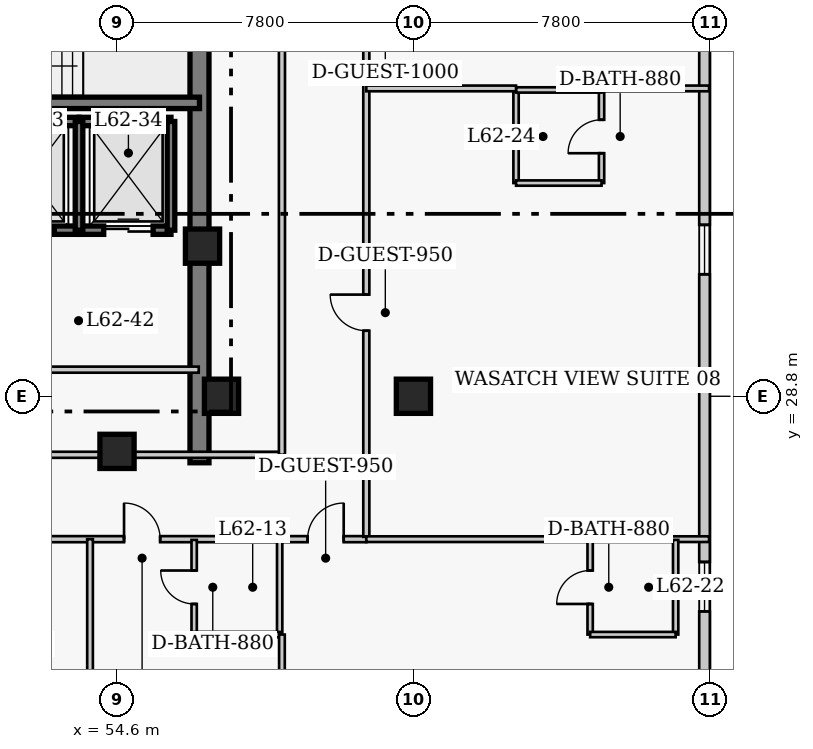
"""IFC4 building model, lengths in metres.
Left out: names, types, materials, properties, quantities, classifications, styles, units other than length and angle.
Written with IfcOpenShell. Run it as: python <this file> out.ifc"""

import sys

from ifc_helpers import new_model, si_unit, direction, frame, frame_2d, origin, origin_2d, place, context, subcontext, project, spatial, rectangle, extrude, element, fill, save


model = new_model("IFC4")
c1 = context("Model", 3, precision=1e-05, world=origin(), true_north=direction((0.0, 1.0)))
c2 = subcontext(c1, "Body", "Model", "MODEL_VIEW")
j1 = project(units=[si_unit("LENGTHUNIT", "METRE"), si_unit("PLANEANGLEUNIT", "RADIAN")], contexts=[c1])
p1 = place(None, origin())
s1 = spatial("IfcSite", under=j1, at=p1, CompositionType="ELEMENT")
p2 = place(p1, origin())
s2 = spatial("IfcBuilding", under=s1, at=p2, CompositionType="ELEMENT")
p3 = place(p2, frame((0.0, 0.0, 249.4)))
s3 = spatial("IfcBuildingStorey", under=s2, at=p3, CompositionType="ELEMENT", Elevation=249.4)
p4 = place(p3, frame((56.77, 27.05, 0.0), z_axis=(0.0, 0.0, 1.0), x_axis=(0.0, 1.0, 0.0)))
e1 = element("IfcWall", 1, at=p4, inside=s3, PredefinedType="SHEAR", context=c2, shape_type="SweptSolid", body=[
    extrude(rectangle(XDim=13.52, YDim=0.5, at=frame_2d((6.76, 0.0))), origin(), (0.0, 0.0, 1.0), 4.0),
])
p5 = place(p3, frame((48.45, 36.52, 0.0), z_axis=(0.0, 0.0, 1.0), x_axis=(1.0, 0.0, 0.0)))
e2 = element("IfcWall", 2, at=p5, inside=s3, PredefinedType="SHEAR", context=c2, shape_type="SweptSolid", body=[
    extrude(rectangle(XDim=8.32, YDim=0.3, at=frame_2d((4.16, 0.0))), origin(), (0.0, 0.0, 1.0), 4.0),
])
for number, where, z_axis, x_axis in (
    (3, (62.4, 28.8, 0.0), (0.0, 0.0, 1.0), (1.0, 0.0, 0.0)),
    (4, (57.35, 28.8, 0.0), (0.0, 0.0, 1.0), (1.0, 0.0, 0.0)),
    (5, (54.6, 27.35, 0.0), (0.0, 0.0, 1.0), (1.0, 0.0, 0.0)),
    (6, (56.85, 32.75, 0.0), (0.0, 0.0, 1.0), (1.0, 0.0, 0.0)),
):
    element("IfcColumn", number, at=place(p3, frame(where, z_axis=z_axis, x_axis=x_axis)), inside=s3, PredefinedType="COLUMN", context=c2, shape_type="SweptSolid", body=[
        extrude(rectangle(XDim=0.9, YDim=0.9, at=origin_2d()), origin(), (0.0, 0.0, 1.0), 4.0),
    ])
p6 = place(p3, frame((70.06, 13.36, 0.0), z_axis=(0.0, 0.0, 1.0), x_axis=(0.0, 1.0, 0.0)))
e7 = element("IfcWall", 7, at=p6, inside=s3, PredefinedType="SOLIDWALL", context=c2, shape_type="SweptSolid", body=[
    extrude(rectangle(XDim=30.88, YDim=0.28, at=frame_2d((15.44, 0.0))), origin(), (0.0, 0.0, 1.0), 3.76),
])
p7 = place(p6, frame((3.21, 0.0, 0.85)))
e8 = element("IfcOpeningElement", 8, at=p7, cuts=e7, PredefinedType="OPENING", context=c2, shape_type="SweptSolid", body=[
    extrude(rectangle(XDim=1.3, YDim=1.7, at=frame_2d((0.65, 0.85))), frame((0.0, 0.15, 0.0), z_axis=(0.0, -1.0, 0.0), x_axis=(1.0, 0.0, 0.0)), (0.0, 0.0, 1.0), 0.3),
])
p8 = place(p6, frame((9.78, 0.0, 0.85)))
e9 = element("IfcOpeningElement", 9, at=p8, cuts=e7, PredefinedType="OPENING", context=c2, shape_type="SweptSolid", body=[
    extrude(rectangle(XDim=1.3, YDim=1.7, at=frame_2d((0.65, 0.85))), frame((0.0, 0.15, 0.0), z_axis=(0.0, -1.0, 0.0), x_axis=(1.0, 0.0, 0.0)), (0.0, 0.0, 1.0), 0.3),
])
p9 = place(p6, frame((18.65, 0.0, 0.85)))
e10 = element("IfcOpeningElement", 10, at=p9, cuts=e7, PredefinedType="OPENING", context=c2, shape_type="SweptSolid", body=[
    extrude(rectangle(XDim=1.3, YDim=1.7, at=frame_2d((0.65, 0.85))), frame((0.0, 0.15, 0.0), z_axis=(0.0, -1.0, 0.0), x_axis=(1.0, 0.0, 0.0)), (0.0, 0.0, 1.0), 0.3),
])
p10 = place(p6, frame((26.37, 0.0, 0.85)))
e11 = element("IfcOpeningElement", 11, at=p10, cuts=e7, PredefinedType="OPENING", context=c2, shape_type="SweptSolid", body=[
    extrude(rectangle(XDim=1.3, YDim=1.7, at=frame_2d((0.65, 0.85))), frame((0.0, 0.15, 0.0), z_axis=(0.0, -1.0, 0.0), x_axis=(1.0, 0.0, 0.0)), (0.0, 0.0, 1.0), 0.3),
])
p11 = place(p3, frame((51.18, 36.03, 0.0), z_axis=(0.0, 0.0, 1.0), x_axis=(1.0, 0.0, 0.0)))
e12 = element("IfcWall", 12, at=p11, inside=s3, PredefinedType="SHEAR", context=c2, shape_type="SweptSolid", body=[
    extrude(rectangle(XDim=2.42, YDim=0.22, at=frame_2d((1.21, 0.0))), origin(), (0.0, 0.0, 1.0), 4.0),
])
p12 = place(p3, frame((51.18, 33.17, 0.0), z_axis=(0.0, 0.0, 1.0), x_axis=(1.0, 0.0, 0.0)))
e13 = element("IfcWall", 13, at=p12, inside=s3, PredefinedType="SHEAR", context=c2, shape_type="SweptSolid", body=[
    extrude(rectangle(XDim=2.42, YDim=0.22, at=frame_2d((1.21, 0.0))), origin(), (0.0, 0.0, 1.0), 4.0),
])
p13 = place(p12, frame((0.47, 0.0, 0.0)))
e14 = element("IfcOpeningElement", 14, at=p13, cuts=e13, PredefinedType="OPENING", context=c2, shape_type="SweptSolid", body=[
    extrude(rectangle(XDim=1.3, YDim=2.15, at=frame_2d((0.65, 1.075))), frame((0.0, 0.12, 0.0), z_axis=(0.0, -1.0, 0.0), x_axis=(1.0, 0.0, 0.0)), (0.0, 0.0, 1.0), 0.24),
])
p14 = place(p3, frame((53.6, 36.03, 0.0), z_axis=(0.0, 0.0, 1.0), x_axis=(1.0, 0.0, 0.0)))
e15 = element("IfcWall", 15, at=p14, inside=s3, PredefinedType="SHEAR", context=c2, shape_type="SweptSolid", body=[
    extrude(rectangle(XDim=2.42, YDim=0.22, at=frame_2d((1.21, 0.0))), origin(), (0.0, 0.0, 1.0), 4.0),
])
p15 = place(p3, frame((53.6, 33.17, 0.0), z_axis=(0.0, 0.0, 1.0), x_axis=(1.0, 0.0, 0.0)))
e16 = element("IfcWall", 16, at=p15, inside=s3, PredefinedType="SHEAR", context=c2, shape_type="SweptSolid", body=[
    extrude(rectangle(XDim=2.42, YDim=0.22, at=frame_2d((1.21, 0.0))), origin(), (0.0, 0.0, 1.0), 4.0),
])
p16 = place(p15, frame((0.65, 0.0, 0.0)))
e17 = element("IfcOpeningElement", 17, at=p16, cuts=e16, PredefinedType="OPENING", context=c2, shape_type="SweptSolid", body=[
    extrude(rectangle(XDim=1.3, YDim=2.15, at=frame_2d((0.65, 1.075))), frame((0.0, 0.12, 0.0), z_axis=(0.0, -1.0, 0.0), x_axis=(1.0, 0.0, 0.0)), (0.0, 0.0, 1.0), 0.24),
])
for number, where, z_axis, x_axis in (
    (18, (53.6, 33.17, 0.0), (0.0, 0.0, 1.0), (0.0, 1.0, 0.0)),
    (19, (56.02, 33.17, 0.0), (0.0, 0.0, 1.0), (0.0, 1.0, 0.0)),
):
    element("IfcWall", number, at=place(p3, frame(where, z_axis=z_axis, x_axis=x_axis)), inside=s3, PredefinedType="SHEAR", context=c2, shape_type="SweptSolid", body=[
        extrude(rectangle(XDim=2.86, YDim=0.2, at=frame_2d((1.43, 0.0))), origin(), (0.0, 0.0, 1.0), 4.0),
    ])
p17 = place(p3, frame((51.12, 29.5, 0.0), z_axis=(0.0, 0.0, 1.0), x_axis=(1.0, 0.0, 0.0)))
e20 = element("IfcWall", 20, at=p17, inside=s3, PredefinedType="PARTITIONING", context=c2, shape_type="SweptSolid", body=[
    extrude(rectangle(XDim=5.63, YDim=0.16, at=frame_2d((2.815, 0.0))), origin(), (0.0, 0.0, 1.0), 3.76),
])
p18 = place(p3, frame((35.85, 27.26, 0.0), z_axis=(0.0, 0.0, 1.0), x_axis=(1.0, 0.0, 0.0)))
e21 = element("IfcWall", 21, at=p18, inside=s3, PredefinedType="PARTITIONING", context=c2, shape_type="SweptSolid", body=[
    extrude(rectangle(XDim=23.15, YDim=0.16, at=frame_2d((11.575, 0.0))), origin(), (0.0, 0.0, 1.0), 3.76),
])
p19 = place(p18, frame((5.35, 0.0, 0.0)))
e22 = element("IfcOpeningElement", 22, at=p19, cuts=e21, PredefinedType="OPENING", context=c2, shape_type="SweptSolid", body=[
    extrude(rectangle(XDim=1.0, YDim=2.15, at=frame_2d((0.5, 1.075))), frame((0.0, 0.09, 0.0), z_axis=(0.0, -1.0, 0.0), x_axis=(1.0, 0.0, 0.0)), (0.0, 0.0, 1.0), 0.18),
])
p20 = place(p18, frame((12.85, 0.0, 0.0)))
e23 = element("IfcOpeningElement", 23, at=p20, cuts=e21, PredefinedType="OPENING", context=c2, shape_type="SweptSolid", body=[
    extrude(rectangle(XDim=1.0, YDim=2.15, at=frame_2d((0.5, 1.075))), frame((0.0, 0.09, 0.0), z_axis=(0.0, -1.0, 0.0), x_axis=(1.0, 0.0, 0.0)), (0.0, 0.0, 1.0), 0.18),
])
p21 = place(p3, frame((35.8, 25.04, 0.0), z_axis=(0.0, 0.0, 1.0), x_axis=(1.0, 0.0, 0.0)))
e24 = element("IfcWall", 24, at=p21, inside=s3, PredefinedType="PARTITIONING", context=c2, shape_type="SweptSolid", body=[
    extrude(rectangle(XDim=25.36, YDim=0.16, at=frame_2d((12.68, 0.0))), origin(), (0.0, 0.0, 1.0), 3.76),
])
p22 = place(p21, frame((1.518, 0.0, 0.0)))
e25 = element("IfcOpeningElement", 25, at=p22, cuts=e24, PredefinedType="OPENING", context=c2, shape_type="SweptSolid", body=[
    extrude(rectangle(XDim=0.95, YDim=2.1, at=frame_2d((0.475, 1.05))), frame((0.0, 0.09, 0.0), z_axis=(0.0, -1.0, 0.0), x_axis=(1.0, 0.0, 0.0)), (0.0, 0.0, 1.0), 0.18),
])
p23 = place(p21, frame((9.278, 0.0, 0.0)))
e26 = element("IfcOpeningElement", 26, at=p23, cuts=e24, PredefinedType="OPENING", context=c2, shape_type="SweptSolid", body=[
    extrude(rectangle(XDim=1.0, YDim=2.15, at=frame_2d((0.5, 1.075))), frame((0.0, 0.09, 0.0), z_axis=(0.0, -1.0, 0.0), x_axis=(1.0, 0.0, 0.0)), (0.0, 0.0, 1.0), 0.18),
])
p24 = place(p21, frame((16.06, 0.0, 0.0)))
e27 = element("IfcOpeningElement", 27, at=p24, cuts=e24, PredefinedType="OPENING", context=c2, shape_type="SweptSolid", body=[
    extrude(rectangle(XDim=0.95, YDim=2.1, at=frame_2d((0.475, 1.05))), frame((0.0, 0.09, 0.0), z_axis=(0.0, -1.0, 0.0), x_axis=(1.0, 0.0, 0.0)), (0.0, 0.0, 1.0), 0.18),
])
p25 = place(p21, frame((18.985, 0.0, 0.0)))
e28 = element("IfcOpeningElement", 28, at=p25, cuts=e24, PredefinedType="OPENING", context=c2, shape_type="SweptSolid", body=[
    extrude(rectangle(XDim=0.95, YDim=2.1, at=frame_2d((0.475, 1.05))), frame((0.0, 0.09, 0.0), z_axis=(0.0, -1.0, 0.0), x_axis=(1.0, 0.0, 0.0)), (0.0, 0.0, 1.0), 0.18),
])
p26 = place(p21, frame((23.815, 0.0, 0.0)))
e29 = element("IfcOpeningElement", 29, at=p26, cuts=e24, PredefinedType="OPENING", context=c2, shape_type="SweptSolid", body=[
    extrude(rectangle(XDim=0.95, YDim=2.1, at=frame_2d((0.475, 1.05))), frame((0.0, 0.09, 0.0), z_axis=(0.0, -1.0, 0.0), x_axis=(1.0, 0.0, 0.0)), (0.0, 0.0, 1.0), 0.18),
])
p27 = place(p3, frame((61.16, 25.1, 0.0), z_axis=(0.0, 0.0, 1.0), x_axis=(0.0, 1.0, 0.0)))
e30 = element("IfcWall", 30, at=p27, inside=s3, PredefinedType="PARTITIONING", context=c2, shape_type="SweptSolid", body=[
    extrude(rectangle(XDim=15.55, YDim=0.16, at=frame_2d((7.775, 0.0))), origin(), (0.0, 0.0, 1.0), 3.76),
])
p28 = place(p27, frame((5.425, 0.0, 0.0)))
e31 = element("IfcOpeningElement", 31, at=p28, cuts=e30, PredefinedType="OPENING", context=c2, shape_type="SweptSolid", body=[
    extrude(rectangle(XDim=0.95, YDim=2.1, at=frame_2d((0.475, 1.05))), frame((0.0, 0.09, 0.0), z_axis=(0.0, -1.0, 0.0), x_axis=(1.0, 0.0, 0.0)), (0.0, 0.0, 1.0), 0.18),
])
p29 = place(p27, frame((14.11, 0.0, 0.0)))
e32 = element("IfcOpeningElement", 32, at=p29, cuts=e30, PredefinedType="OPENING", context=c2, shape_type="SweptSolid", body=[
    extrude(rectangle(XDim=1.0, YDim=2.15, at=frame_2d((0.5, 1.075))), frame((0.0, 0.09, 0.0), z_axis=(0.0, -1.0, 0.0), x_axis=(1.0, 0.0, 0.0)), (0.0, 0.0, 1.0), 0.18),
])
p30 = place(p3, frame((58.94, 27.26, 0.0), z_axis=(0.0, 0.0, 1.0), x_axis=(0.0, 1.0, 0.0)))
e33 = element("IfcWall", 33, at=p30, inside=s3, PredefinedType="PARTITIONING", context=c2, shape_type="SweptSolid", body=[
    extrude(rectangle(XDim=13.39, YDim=0.16, at=frame_2d((6.695, 0.0))), origin(), (0.0, 0.0, 1.0), 3.76),
])
p31 = place(p3, frame((53.89, 9.72, 0.0), z_axis=(0.0, 0.0, 1.0), x_axis=(0.0, 1.0, 0.0)))
e34 = element("IfcWall", 34, at=p31, inside=s3, PredefinedType="PARTITIONING", context=c2, shape_type="SweptSolid", body=[
    extrude(rectangle(XDim=15.32, YDim=0.15, at=frame_2d((7.66, 0.0))), origin(), (0.0, 0.0, 1.0), 3.76),
])
p32 = place(p3, frame((56.63, 22.53, 0.0), z_axis=(0.0, 0.0, 1.0), x_axis=(0.0, 1.0, 0.0)))
e35 = element("IfcWall", 35, at=p32, inside=s3, PredefinedType="PLUMBINGWALL", context=c2, shape_type="SweptSolid", body=[
    extrude(rectangle(XDim=2.49, YDim=0.14, at=frame_2d((1.245, 0.0))), origin(), (0.0, 0.0, 1.0), 3.76),
])
p33 = place(p32, frame((0.805, 0.0, 0.0)))
e36 = element("IfcOpeningElement", 36, at=p33, cuts=e35, PredefinedType="OPENING", context=c2, shape_type="SweptSolid", body=[
    extrude(rectangle(XDim=0.88, YDim=2.05, at=frame_2d((0.44, 1.025))), frame((0.0, 0.08, 0.0), z_axis=(0.0, -1.0, 0.0), x_axis=(1.0, 0.0, 0.0)), (0.0, 0.0, 1.0), 0.16),
])
p34 = place(p3, frame((58.88, 22.53, 0.0), z_axis=(0.0, 0.0, 1.0), x_axis=(0.0, 1.0, 0.0)))
e37 = element("IfcWall", 37, at=p34, inside=s3, PredefinedType="PLUMBINGWALL", context=c2, shape_type="SweptSolid", body=[
    extrude(rectangle(XDim=2.49, YDim=0.14, at=frame_2d((1.245, 0.0))), origin(), (0.0, 0.0, 1.0), 3.76),
])
p35 = place(p3, frame((56.63, 22.53, 0.0), z_axis=(0.0, 0.0, 1.0), x_axis=(1.0, 0.0, 0.0)))
e38 = element("IfcWall", 38, at=p35, inside=s3, PredefinedType="PLUMBINGWALL", context=c2, shape_type="SweptSolid", body=[
    extrude(rectangle(XDim=2.25, YDim=0.14, at=frame_2d((1.125, 0.0))), origin(), (0.0, 0.0, 1.0), 3.76),
])
p36 = place(p3, frame((58.94, 9.72, 0.0), z_axis=(0.0, 0.0, 1.0), x_axis=(0.0, 1.0, 0.0)))
e39 = element("IfcWall", 39, at=p36, inside=s3, PredefinedType="PARTITIONING", context=c2, shape_type="SweptSolid", body=[
    extrude(rectangle(XDim=12.81, YDim=0.15, at=frame_2d((6.405, 0.0))), origin(), (0.0, 0.0, 1.0), 3.76),
])
p37 = place(p3, frame((61.16, 25.04, 0.0), z_axis=(0.0, 0.0, 1.0), x_axis=(1.0, 0.0, 0.0)))
e40 = element("IfcWall", 40, at=p37, inside=s3, PredefinedType="PARTITIONING", context=c2, shape_type="SweptSolid", body=[
    extrude(rectangle(XDim=9.02, YDim=0.15, at=frame_2d((4.51, 0.0))), origin(), (0.0, 0.0, 1.0), 3.76),
])
p38 = place(p3, frame((67.05, 22.53, 0.0), z_axis=(0.0, 0.0, 1.0), x_axis=(0.0, 1.0, 0.0)))
e41 = element("IfcWall", 41, at=p38, inside=s3, PredefinedType="PLUMBINGWALL", context=c2, shape_type="SweptSolid", body=[
    extrude(rectangle(XDim=2.49, YDim=0.14, at=frame_2d((1.245, 0.0))), origin(), (0.0, 0.0, 1.0), 3.76),
])
p39 = place(p38, frame((0.805, 0.0, 0.0)))
e42 = element("IfcOpeningElement", 42, at=p39, cuts=e41, PredefinedType="OPENING", context=c2, shape_type="SweptSolid", body=[
    extrude(rectangle(XDim=0.88, YDim=2.05, at=frame_2d((0.44, 1.025))), frame((0.0, 0.08, 0.0), z_axis=(0.0, -1.0, 0.0), x_axis=(1.0, 0.0, 0.0)), (0.0, 0.0, 1.0), 0.16),
])
p40 = place(p3, frame((69.3, 22.53, 0.0), z_axis=(0.0, 0.0, 1.0), x_axis=(0.0, 1.0, 0.0)))
e43 = element("IfcWall", 43, at=p40, inside=s3, PredefinedType="PLUMBINGWALL", context=c2, shape_type="SweptSolid", body=[
    extrude(rectangle(XDim=2.49, YDim=0.14, at=frame_2d((1.245, 0.0))), origin(), (0.0, 0.0, 1.0), 3.76),
])
p41 = place(p3, frame((67.05, 22.53, 0.0), z_axis=(0.0, 0.0, 1.0), x_axis=(1.0, 0.0, 0.0)))
e44 = element("IfcWall", 44, at=p41, inside=s3, PredefinedType="PLUMBINGWALL", context=c2, shape_type="SweptSolid", body=[
    extrude(rectangle(XDim=2.25, YDim=0.14, at=frame_2d((1.125, 0.0))), origin(), (0.0, 0.0, 1.0), 3.76),
])
p42 = place(p3, frame((65.1, 34.41, 0.0), z_axis=(0.0, 0.0, 1.0), x_axis=(0.0, 1.0, 0.0)))
e45 = element("IfcWall", 45, at=p42, inside=s3, PredefinedType="PLUMBINGWALL", context=c2, shape_type="SweptSolid", body=[
    extrude(rectangle(XDim=2.45, YDim=0.14, at=frame_2d((1.225, 0.0))), origin(), (0.0, 0.0, 1.0), 3.76),
])
p43 = place(p3, frame((67.35, 34.41, 0.0), z_axis=(0.0, 0.0, 1.0), x_axis=(0.0, 1.0, 0.0)))
e46 = element("IfcWall", 46, at=p43, inside=s3, PredefinedType="PLUMBINGWALL", context=c2, shape_type="SweptSolid", body=[
    extrude(rectangle(XDim=2.45, YDim=0.14, at=frame_2d((1.225, 0.0))), origin(), (0.0, 0.0, 1.0), 3.76),
])
p44 = place(p43, frame((0.785, 0.0, 0.0)))
e47 = element("IfcOpeningElement", 47, at=p44, cuts=e46, PredefinedType="OPENING", context=c2, shape_type="SweptSolid", body=[
    extrude(rectangle(XDim=0.88, YDim=2.05, at=frame_2d((0.44, 1.025))), frame((0.0, 0.08, 0.0), z_axis=(0.0, -1.0, 0.0), x_axis=(1.0, 0.0, 0.0)), (0.0, 0.0, 1.0), 0.16),
])
for number, where, z_axis, x_axis in (
    (48, (65.1, 34.41, 0.0), (0.0, 0.0, 1.0), (1.0, 0.0, 0.0)),
    (49, (65.1, 36.86, 0.0), (0.0, 0.0, 1.0), (1.0, 0.0, 0.0)),
):
    element("IfcWall", number, at=place(p3, frame(where, z_axis=z_axis, x_axis=x_axis)), inside=s3, PredefinedType="PLUMBINGWALL", context=c2, shape_type="SweptSolid", body=[
        extrude(rectangle(XDim=2.25, YDim=0.14, at=frame_2d((1.125, 0.0))), origin(), (0.0, 0.0, 1.0), 3.76),
    ])
p45 = place(p3, frame((61.16, 36.9, 0.0), z_axis=(0.0, 0.0, 1.0), x_axis=(1.0, 0.0, 0.0)))
e50 = element("IfcWall", 50, at=p45, inside=s3, PredefinedType="PARTITIONING", context=c2, shape_type="SweptSolid", body=[
    extrude(rectangle(XDim=3.94, YDim=0.15, at=frame_2d((1.97, 0.0))), origin(), (0.0, 0.0, 1.0), 3.76),
])
p46 = place(p3, frame((67.35, 36.9, 0.0), z_axis=(0.0, 0.0, 1.0), x_axis=(1.0, 0.0, 0.0)))
e51 = element("IfcWall", 51, at=p46, inside=s3, PredefinedType="PARTITIONING", context=c2, shape_type="SweptSolid", body=[
    extrude(rectangle(XDim=2.83, YDim=0.15, at=frame_2d((1.415, 0.0))), origin(), (0.0, 0.0, 1.0), 3.76),
])
p47 = place(p8, origin())
e52 = element("IfcWindow", 52, at=p47, inside=s3, PartitioningType="SINGLE_PANEL", PredefinedType="WINDOW", context=c2, shape_type="SweptSolid", body=[
    extrude(rectangle(XDim=1.3, YDim=1.7, at=frame_2d((0.65, 0.85))), frame((0.0, 0.03, 0.0), z_axis=(0.0, -1.0, 0.0), x_axis=(1.0, 0.0, 0.0)), (0.0, 0.0, 1.0), 0.06),
])
fill(e9, e52)
p48 = place(p9, origin())
e53 = element("IfcWindow", 53, at=p48, inside=s3, PartitioningType="SINGLE_PANEL", PredefinedType="WINDOW", context=c2, shape_type="SweptSolid", body=[
    extrude(rectangle(XDim=1.3, YDim=1.7, at=frame_2d((0.65, 0.85))), frame((0.0, 0.03, 0.0), z_axis=(0.0, -1.0, 0.0), x_axis=(1.0, 0.0, 0.0)), (0.0, 0.0, 1.0), 0.06),
])
fill(e10, e53)
p49 = place(p13, origin())
e54 = element("IfcDoor", 54, at=p49, inside=s3, OperationType="DOUBLE_DOOR_SLIDING", PredefinedType="DOOR", context=c2, shape_type="SweptSolid", body=[
    extrude(rectangle(XDim=1.3, YDim=2.15, at=frame_2d((0.65, 1.075))), frame((0.0, 0.025, 0.0), z_axis=(0.0, -1.0, 0.0), x_axis=(1.0, 0.0, 0.0)), (0.0, 0.0, 1.0), 0.05),
])
fill(e14, e54)
p50 = place(p16, origin())
e55 = element("IfcDoor", 55, at=p50, inside=s3, OperationType="DOUBLE_DOOR_SLIDING", PredefinedType="DOOR", context=c2, shape_type="SweptSolid", body=[
    extrude(rectangle(XDim=1.3, YDim=2.15, at=frame_2d((0.65, 1.075))), frame((0.0, 0.025, 0.0), z_axis=(0.0, -1.0, 0.0), x_axis=(1.0, 0.0, 0.0)), (0.0, 0.0, 1.0), 0.05),
])
fill(e17, e55)
p51 = place(p33, origin())
e56 = element("IfcDoor", 56, at=p51, inside=s3, OperationType="SINGLE_SWING_RIGHT", PredefinedType="DOOR", context=c2, shape_type="SweptSolid", body=[
    extrude(rectangle(XDim=0.88, YDim=2.05, at=frame_2d((0.44, 1.025))), frame((0.0, 0.025, 0.0), z_axis=(0.0, -1.0, 0.0), x_axis=(1.0, 0.0, 0.0)), (0.0, 0.0, 1.0), 0.05),
])
fill(e36, e56)
p52 = place(p25, origin())
e57 = element("IfcDoor", 57, at=p52, inside=s3, OperationType="SINGLE_SWING_LEFT", PredefinedType="DOOR", context=c2, shape_type="SweptSolid", body=[
    extrude(rectangle(XDim=0.95, YDim=2.1, at=frame_2d((0.475, 1.05))), frame((0.0, 0.025, 0.0), z_axis=(0.0, -1.0, 0.0), x_axis=(1.0, 0.0, 0.0)), (0.0, 0.0, 1.0), 0.05),
])
fill(e28, e57)
p53 = place(p39, origin())
e58 = element("IfcDoor", 58, at=p53, inside=s3, OperationType="SINGLE_SWING_LEFT", PredefinedType="DOOR", context=c2, shape_type="SweptSolid", body=[
    extrude(rectangle(XDim=0.88, YDim=2.05, at=frame_2d((0.44, 1.025))), frame((0.0, 0.025, 0.0), z_axis=(0.0, -1.0, 0.0), x_axis=(1.0, 0.0, 0.0)), (0.0, 0.0, 1.0), 0.05),
])
fill(e42, e58)
p54 = place(p26, origin())
e59 = element("IfcDoor", 59, at=p54, inside=s3, OperationType="SINGLE_SWING_RIGHT", PredefinedType="DOOR", context=c2, shape_type="SweptSolid", body=[
    extrude(rectangle(XDim=0.95, YDim=2.1, at=frame_2d((0.475, 1.05))), frame((0.0, 0.025, 0.0), z_axis=(0.0, -1.0, 0.0), x_axis=(1.0, 0.0, 0.0)), (0.0, 0.0, 1.0), 0.05),
])
fill(e29, e59)
p55 = place(p44, origin())
e60 = element("IfcDoor", 60, at=p55, inside=s3, OperationType="SINGLE_SWING_LEFT", PredefinedType="DOOR", context=c2, shape_type="SweptSolid", body=[
    extrude(rectangle(XDim=0.88, YDim=2.05, at=frame_2d((0.44, 1.025))), frame((0.0, 0.025, 0.0), z_axis=(0.0, -1.0, 0.0), x_axis=(1.0, 0.0, 0.0)), (0.0, 0.0, 1.0), 0.05),
])
fill(e47, e60)
p56 = place(p28, origin())
e61 = element("IfcDoor", 61, at=p56, inside=s3, OperationType="SINGLE_SWING_RIGHT", PredefinedType="DOOR", context=c2, shape_type="SweptSolid", body=[
    extrude(rectangle(XDim=0.95, YDim=2.1, at=frame_2d((0.475, 1.05))), frame((0.0, 0.025, 0.0), z_axis=(0.0, -1.0, 0.0), x_axis=(1.0, 0.0, 0.0)), (0.0, 0.0, 1.0), 0.05),
])
fill(e31, e61)
save(model, sys.argv[1])
